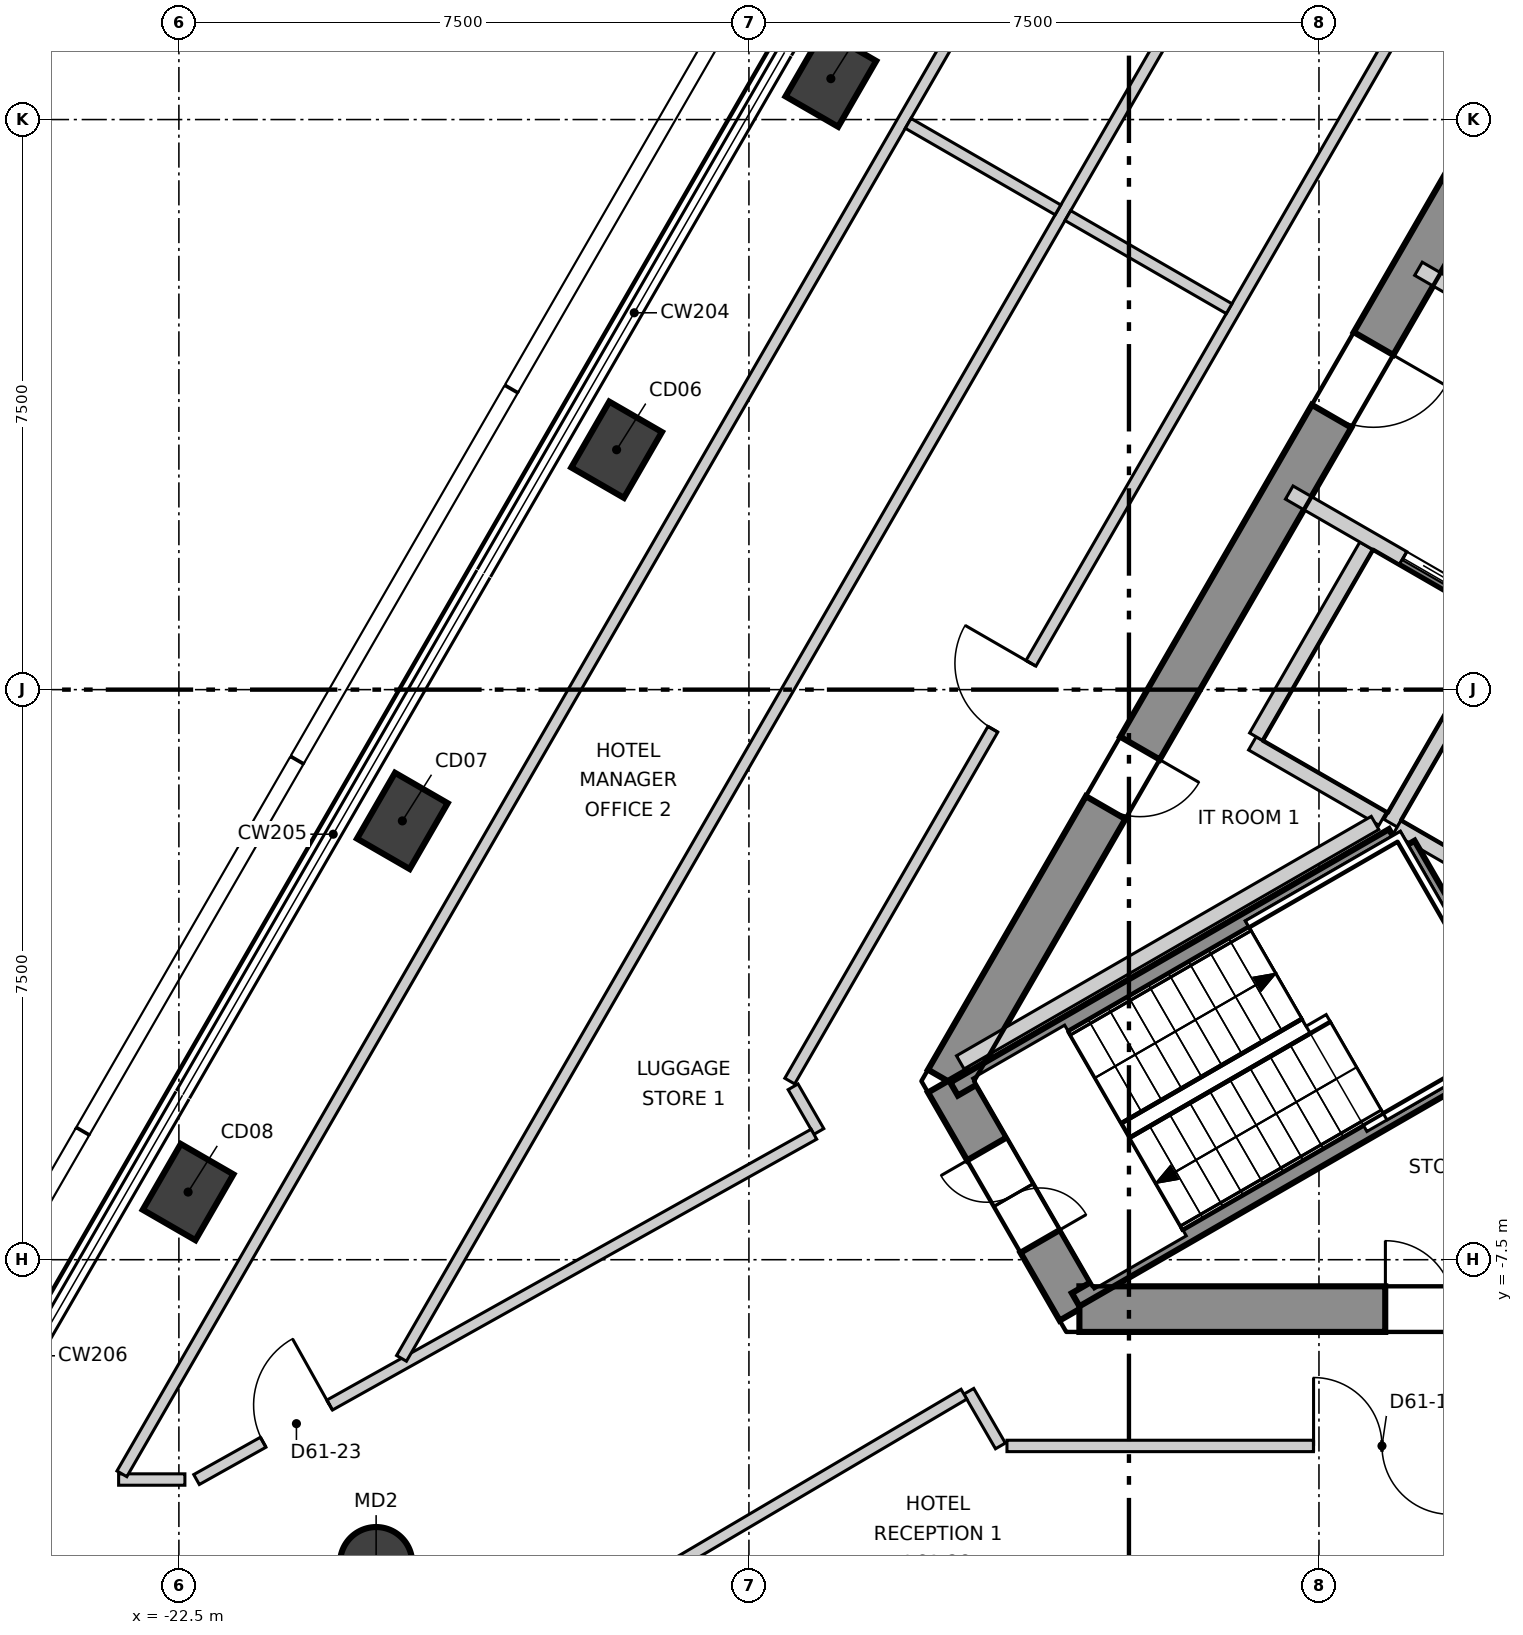
"""IFC4 building model, lengths in metres.
Left out: names, types, materials, properties, quantities, classifications, styles, units other than length and angle.
Written with IfcOpenShell. Run it as: python <this file> out.ifc"""

import sys

from ifc_helpers import new_model, si_unit, direction, frame, frame_2d, origin, origin_2d, place, context, subcontext, project, spatial, polyline, rectangle, circle, outline, extrude, element, fill, save


model = new_model("IFC4")
c1 = context("Model", 3, precision=1e-05, world=origin(), true_north=direction((0.0, 1.0)))
c2 = subcontext(c1, "Body", "Model", "MODEL_VIEW")
j1 = project(units=[si_unit("LENGTHUNIT", "METRE"), si_unit("PLANEANGLEUNIT", "RADIAN")], contexts=[c1])
p1 = place(None, origin())
s1 = spatial("IfcSite", under=j1, at=p1, CompositionType="ELEMENT")
p2 = place(p1, origin())
s2 = spatial("IfcBuilding", under=s1, at=p2, CompositionType="ELEMENT")
p3 = place(p2, frame((0.0, 0.0, 261.8)))
s3 = spatial("IfcBuildingStorey", under=s2, at=p3, CompositionType="ELEMENT", Elevation=261.8)
p4 = place(p3, frame((-1.732, 13.3, -0.3), z_axis=(0.0, 0.0, 1.0), x_axis=(-0.500000539815, -0.866025092122, 0.0)))
e1 = element("IfcWall", 1, at=p4, inside=s3, PredefinedType="SHEAR", context=c2, shape_type="SweptSolid", body=[
    extrude(outline(polyline([(-0.173, -0.3), (1.795, -0.3), (3.763, -0.3), (5.732, -0.3), (7.7, -0.3), (9.668, -0.301), (11.637, -0.301), (13.605, -0.301), (15.573, -0.301), (17.542, -0.301), (19.51, -0.301), (21.478, -0.301), (21.131, 0.3), (19.226, 0.3), (17.321, 0.3), (15.415, 0.3), (13.51, 0.3), (11.605, 0.3), (9.699, 0.3), (7.794, 0.3), (5.889, 0.3), (3.984, 0.3), (2.078, 0.3), (0.173, 0.3), (-0.173, -0.3)])), origin(), (0.0, 0.0, 1.0), 6.5),
])
p5 = place(p4, frame((10.102, 0.0, 0.3)))
e2 = element("IfcOpeningElement", 2, at=p5, cuts=e1, PredefinedType="OPENING", context=c2, shape_type="SweptSolid", body=[
    extrude(rectangle(XDim=1.1, YDim=2.1, at=frame_2d((0.55, 1.05))), frame((0.0, 0.31, 0.0), z_axis=(0.0, -1.0, 0.0), x_axis=(1.0, 0.0, 0.0)), (0.0, 0.0, 1.0), 0.621),
])
p6 = place(p4, frame((16.248, 0.0, 0.3)))
e3 = element("IfcOpeningElement", 3, at=p6, cuts=e1, PredefinedType="OPENING", context=c2, shape_type="SweptSolid", body=[
    extrude(rectangle(XDim=0.9, YDim=2.1, at=frame_2d((0.45, 1.05))), frame((0.0, 0.31, 0.0), z_axis=(0.0, -1.0, 0.0), x_axis=(1.0, 0.0, 0.0)), (0.0, 0.0, 1.0), 0.621),
])
p7 = place(p3, frame((-12.384, -5.15, -0.3), z_axis=(0.0, 0.0, 1.0), x_axis=(0.49997462182, -0.866040055388, 0.0)))
e4 = element("IfcWall", 4, at=p7, inside=s3, PredefinedType="SHEAR", context=c2, shape_type="SweptSolid", body=[
    extrude(outline(polyline([(-0.173, -0.301), (1.732, -0.301), (3.637, -0.3), (3.291, 0.3), (1.732, 0.3), (0.173, 0.3), (-0.173, -0.301)])), origin(), (0.0, 0.0, 1.0), 6.5),
])
p8 = place(p7, frame((1.032, 0.0, 0.3)))
e5 = element("IfcOpeningElement", 5, at=p8, cuts=e4, PredefinedType="OPENING", context=c2, shape_type="SweptSolid", body=[
    extrude(rectangle(XDim=1.4, YDim=2.1, at=frame_2d((0.7, 1.05))), frame((0.0, 0.31, 0.0), z_axis=(0.0, -1.0, 0.0), x_axis=(1.0, 0.0, 0.0)), (0.0, 0.0, 1.0), 0.621),
])
p9 = place(p3, frame((-10.652, -8.15, -0.3), z_axis=(0.0, 0.0, 1.0), x_axis=(1.0, 0.0, 0.0)))
e6 = element("IfcWall", 6, at=p9, inside=s3, PredefinedType="SHEAR", context=c2, shape_type="SweptSolid", body=[
    extrude(outline(polyline([(-0.173, -0.3), (1.795, -0.3), (3.763, -0.3), (5.731, -0.3), (7.7, -0.3), (9.668, -0.3), (11.636, -0.3), (13.604, -0.3), (15.573, -0.3), (17.541, -0.3), (19.509, -0.3), (21.477, -0.3), (21.131, 0.3), (19.226, 0.3), (17.321, 0.3), (15.415, 0.3), (13.51, 0.3), (11.605, 0.3), (9.699, 0.3), (7.794, 0.3), (5.889, 0.3), (3.984, 0.3), (2.078, 0.3), (0.173, 0.3), (-0.173, -0.3)])), origin(), (0.0, 0.0, 1.0), 6.5),
])
p10 = place(p9, frame((4.026, 0.0, 0.3)))
e7 = element("IfcOpeningElement", 7, at=p10, cuts=e6, PredefinedType="OPENING", context=c2, shape_type="SweptSolid", body=[
    extrude(rectangle(XDim=0.9, YDim=2.1, at=frame_2d((0.45, 1.05))), frame((0.0, 0.31, 0.0), z_axis=(0.0, -1.0, 0.0), x_axis=(1.0, 0.0, 0.0)), (0.0, 0.0, 1.0), 0.62),
])
p11 = place(p9, frame((16.378, 0.0, 0.3)))
e8 = element("IfcOpeningElement", 8, at=p11, cuts=e6, PredefinedType="OPENING", context=c2, shape_type="SweptSolid", body=[
    extrude(rectangle(XDim=0.9, YDim=2.1, at=frame_2d((0.45, 1.05))), frame((0.0, 0.31, 0.0), z_axis=(0.0, -1.0, 0.0), x_axis=(1.0, 0.0, 0.0)), (0.0, 0.0, 1.0), 0.62),
])
for number, where, z_axis, x_axis in (
    (9, (-13.922, 8.038, -0.3), (0.0, 0.0, 1.0), (0.5, 0.866, 0.0)),
    (10, (-16.741, 3.156, -0.3), (0.0, 0.0, 1.0), (0.5, 0.866, 0.0)),
    (11, (-19.56, -1.727, -0.3), (0.0, 0.0, 1.0), (0.5, 0.866, 0.0)),
    (12, (-22.379, -6.61, -0.3), (0.0, 0.0, 1.0), (0.5, 0.866, 0.0)),
):
    element("IfcColumn", number, at=place(p3, frame(where, z_axis=z_axis, x_axis=x_axis)), inside=s3, PredefinedType="COLUMN", context=c2, shape_type="SweptSolid", body=[
        extrude(rectangle(XDim=1.0, YDim=0.8, at=origin_2d()), origin(), (0.0, 0.0, 1.0), 6.5),
    ])
p12 = place(p3, frame((-19.905, -11.492, -0.3), z_axis=(0.0, 0.0, 1.0), x_axis=(1.0, 0.0, 0.0)))
e13 = element("IfcColumn", 13, at=p12, inside=s3, PredefinedType="COLUMN", context=c2, shape_type="SweptSolid", body=[
    extrude(circle(Radius=0.475, at=origin_2d()), origin(), (0.0, 0.0, 1.0), 6.5),
])
p13 = place(p3, frame((-14.463, -5.15, 0.0), z_axis=(0.0, 0.0, 1.0), x_axis=(0.500017691629, 0.866015189277, 0.0)))
e14 = element("IfcWall", 14, at=p13, inside=s3, PredefinedType="PARTITIONING", context=c2, shape_type="SweptSolid", body=[
    extrude(rectangle(XDim=23.383, YDim=0.15, at=frame_2d((11.691, 0.0))), origin(), (0.0, 0.0, 1.0), 6.2),
])
p14 = place(p13, frame((17.037, 0.0, 0.0)))
e15 = element("IfcOpeningElement", 15, at=p14, cuts=e14, PredefinedType="OPENING", context=c2, shape_type="SweptSolid", body=[
    extrude(rectangle(XDim=1.0, YDim=2.1, at=frame_2d((0.5, 1.05))), frame((0.0, 0.085, 0.0), z_axis=(0.0, -1.0, 0.0), x_axis=(1.0, 0.0, 0.0)), (0.0, 0.0, 1.0), 0.17),
])
p15 = place(p13, frame((5.346, 0.0, 0.0)))
e16 = element("IfcOpeningElement", 16, at=p15, cuts=e14, PredefinedType="OPENING", context=c2, shape_type="SweptSolid", body=[
    extrude(rectangle(XDim=1.0, YDim=2.1, at=frame_2d((0.5, 1.05))), frame((0.0, 0.085, 0.0), z_axis=(0.0, -1.0, 0.0), x_axis=(1.0, 0.0, 0.0)), (0.0, 0.0, 1.0), 0.17),
])
p16 = place(p3, frame((-14.419, -5.225, 0.0), z_axis=(0.0, 0.0, 1.0), x_axis=(0.499390178911, -0.866377197996, 0.0)))
e17 = element("IfcWall", 17, at=p16, inside=s3, PredefinedType="PARTITIONING", context=c2, shape_type="SweptSolid", body=[
    extrude(rectangle(XDim=0.678, YDim=0.15, at=frame_2d((0.339, 0.0))), origin(), (0.0, 0.0, 1.0), 6.2),
])
p17 = place(p3, frame((-12.107, -9.231, 0.0), z_axis=(0.0, 0.0, 1.0), x_axis=(0.500816129582, -0.865553698133, 0.0)))
e18 = element("IfcWall", 18, at=p17, inside=s3, PredefinedType="PARTITIONING", context=c2, shape_type="SweptSolid", body=[
    extrude(rectangle(XDim=0.831, YDim=0.15, at=frame_2d((0.415, 0.0))), origin(), (0.0, 0.0, 1.0), 6.2),
])
p18 = place(p3, frame((-22.268, -10.392, 0.0), z_axis=(0.0, 0.0, 1.0), x_axis=(0.872777845943, 0.488117641179, 0.0)))
e19 = element("IfcWall", 19, at=p18, inside=s3, PredefinedType="PARTITIONING", context=c2, shape_type="SweptSolid", body=[
    extrude(rectangle(XDim=9.307, YDim=0.15, at=frame_2d((4.654, 0.0))), origin(), (0.0, 0.0, 1.0), 5.65),
])
p19 = place(p18, frame((1.006, 0.0, 0.0)))
e20 = element("IfcOpeningElement", 20, at=p19, cuts=e19, PredefinedType="OPENING", context=c2, shape_type="SweptSolid", body=[
    extrude(rectangle(XDim=1.0, YDim=2.1, at=frame_2d((0.5, 1.05))), frame((0.0, 0.085, 0.0), z_axis=(0.0, -1.0, 0.0), x_axis=(1.0, 0.0, 0.0)), (0.0, 0.0, 1.0), 0.17),
])
p20 = place(p3, frame((-19.571, -8.798, 0.0), z_axis=(0.0, 0.0, 1.0), x_axis=(0.500014166641, 0.866017224516, 0.0)))
e21 = element("IfcWall", 21, at=p20, inside=s3, PredefinedType="PARTITIONING", context=c2, shape_type="SweptSolid", body=[
    extrude(rectangle(XDim=34.991, YDim=0.15, at=frame_2d((17.496, 0.0))), origin(), (0.0, 0.0, 1.0), 6.2),
])
p21 = place(p3, frame((-23.293, -10.392, 0.0), z_axis=(0.0, 0.0, 1.0), x_axis=(1.0, 0.0, 0.0)))
e22 = element("IfcWall", 22, at=p21, inside=s3, PredefinedType="PARTITIONING", context=c2, shape_type="SweptSolid", body=[
    extrude(rectangle(XDim=0.872, YDim=0.15, at=frame_2d((0.436, 0.0))), origin(), (0.0, 0.0, 1.0), 6.2),
])
p22 = place(p3, frame((-23.25, -10.317, 0.0), z_axis=(0.0, 0.0, 1.0), x_axis=(0.500024875003, 0.866011041719, 0.0)))
e23 = element("IfcWall", 23, at=p22, inside=s3, PredefinedType="PARTITIONING", context=c2, shape_type="SweptSolid", body=[
    extrude(rectangle(XDim=41.206, YDim=0.15, at=frame_2d((20.603, 0.0))), origin(), (0.0, 0.0, 1.0), 6.2),
])
p23 = place(p3, frame((-20.026, -13.902, 0.0), z_axis=(0.0, 0.0, 1.0), x_axis=(0.861335565544, 0.508036458859, 0.0)))
e24 = element("IfcWall", 24, at=p23, inside=s3, PredefinedType="PARTITIONING", context=c2, shape_type="SweptSolid", body=[
    extrude(rectangle(XDim=9.12, YDim=0.15, at=frame_2d((4.56, 0.0))), origin(), (0.0, 0.0, 1.0), 5.65),
])
p24 = place(p3, frame((-11.605, -9.95, 0.0), z_axis=(0.0, 0.0, 1.0), x_axis=(1.0, 0.0, 0.0)))
e25 = element("IfcWall", 25, at=p24, inside=s3, PredefinedType="PARTITIONING", context=c2, shape_type="SweptSolid", body=[
    extrude(rectangle(XDim=23.296, YDim=0.15, at=frame_2d((11.648, 0.0))), origin(), (0.0, 0.0, 1.0), 6.2),
])
p25 = place(p24, frame((11.105, 0.0, 0.0)))
e26 = element("IfcOpeningElement", 26, at=p25, cuts=e25, PredefinedType="OPENING", context=c2, shape_type="SweptSolid", body=[
    extrude(rectangle(XDim=1.0, YDim=2.1, at=frame_2d((0.5, 1.05))), frame((0.0, 0.085, 0.0), z_axis=(0.0, -1.0, 0.0), x_axis=(1.0, 0.0, 0.0)), (0.0, 0.0, 1.0), 0.17),
])
p26 = place(p24, frame((4.034, 0.0, 0.0)))
e27 = element("IfcOpeningElement", 27, at=p26, cuts=e25, PredefinedType="OPENING", context=c2, shape_type="SweptSolid", body=[
    extrude(rectangle(XDim=1.8, YDim=2.1, at=frame_2d((0.9, 1.05))), frame((0.0, 0.085, 0.0), z_axis=(0.0, -1.0, 0.0), x_axis=(1.0, 0.0, 0.0)), (0.0, 0.0, 1.0), 0.17),
])
p27 = place(p24, frame((17.776, 0.0, 0.0)))
e28 = element("IfcOpeningElement", 28, at=p27, cuts=e25, PredefinedType="OPENING", context=c2, shape_type="SweptSolid", body=[
    extrude(rectangle(XDim=1.0, YDim=2.1, at=frame_2d((0.5, 1.05))), frame((0.0, 0.085, 0.0), z_axis=(0.0, -1.0, 0.0), x_axis=(1.0, 0.0, 0.0)), (0.0, 0.0, 1.0), 0.17),
])
p28 = place(p3, frame((-12.905, 7.45, 0.0), z_axis=(0.0, 0.0, 1.0), x_axis=(0.866023021914, -0.500004125498, 0.0)))
e29 = element("IfcWall", 29, at=p28, inside=s3, PredefinedType="PARTITIONING", context=c2, shape_type="SweptSolid", body=[
    extrude(rectangle(XDim=2.276, YDim=0.15, at=frame_2d((1.138, 0.0))), origin(), (0.0, 0.0, 1.0), 5.7),
])
p29 = place(p3, frame((-10.804, 6.237, 0.0), z_axis=(0.0, 0.0, 1.0), x_axis=(0.8660395779, -0.499975448907, 0.0)))
e30 = element("IfcWall", 30, at=p29, inside=s3, PredefinedType="PARTITIONING", context=c2, shape_type="SweptSolid", body=[
    extrude(rectangle(XDim=2.45, YDim=0.15, at=frame_2d((1.225, 0.0))), origin(), (0.0, 0.0, 1.0), 5.7),
])
p30 = place(p3, frame((-8.376, -0.707, 0.0), z_axis=(0.0, 0.0, 1.0), x_axis=(0.866072678707, -0.499918108492, 0.0)))
e31 = element("IfcWall", 31, at=p30, inside=s3, PredefinedType="SOLIDWALL", context=c2, shape_type="SweptSolid", body=[
    extrude(rectangle(XDim=1.98, YDim=0.2, at=frame_2d((0.99, 0.0))), origin(), (0.0, 0.0, 1.0), 6.2),
])
p31 = place(p3, frame((-8.326, -0.62, 0.0), z_axis=(0.0, 0.0, 1.0), x_axis=(0.500023687443, 0.866011727401, 0.0)))
e32 = element("IfcWall", 32, at=p31, inside=s3, PredefinedType="SOLIDWALL", context=c2, shape_type="SweptSolid", body=[
    extrude(rectangle(XDim=2.9, YDim=0.2, at=frame_2d((1.45, 0.0))), origin(), (0.0, 0.0, 1.0), 6.2),
])
p32 = place(p3, frame((-7.891, 2.593, 0.0), z_axis=(0.0, 0.0, 1.0), x_axis=(0.866070917804, -0.499921159118, 0.0)))
e33 = element("IfcWall", 33, at=p32, inside=s3, PredefinedType="SOLIDWALL", context=c2, shape_type="SweptSolid", body=[
    extrude(rectangle(XDim=3.333, YDim=0.2, at=frame_2d((1.666, 0.0))), origin(), (0.0, 0.0, 1.0), 6.2),
])
p33 = place(p32, frame((1.73, 0.0, 0.0)))
e34 = element("IfcOpeningElement", 34, at=p33, cuts=e33, PredefinedType="OPENING", context=c2, shape_type="SweptSolid", body=[
    extrude(rectangle(XDim=1.1, YDim=2.1, at=frame_2d((0.55, 1.05))), frame((0.0, 0.11, 0.0), z_axis=(0.0, -1.0, 0.0), x_axis=(1.0, 0.0, 0.0)), (0.0, 0.0, 1.0), 0.22),
])
p34 = place(p3, frame((-6.191, 5.537, 0.0), z_axis=(0.0, 0.0, 1.0), x_axis=(0.866052607023, -0.499952879648, 0.0)))
e35 = element("IfcWall", 35, at=p34, inside=s3, PredefinedType="SOLIDWALL", context=c2, shape_type="SweptSolid", body=[
    extrude(rectangle(XDim=3.332, YDim=0.2, at=frame_2d((1.666, 0.0))), origin(), (0.0, 0.0, 1.0), 6.2),
])
p35 = place(p34, frame((1.83, 0.0, 0.0)))
e36 = element("IfcOpeningElement", 36, at=p35, cuts=e35, PredefinedType="OPENING", context=c2, shape_type="SweptSolid", body=[
    extrude(rectangle(XDim=0.9, YDim=2.1, at=frame_2d((0.45, 1.05))), frame((0.0, 0.11, 0.0), z_axis=(0.0, -1.0, 0.0), x_axis=(1.0, 0.0, 0.0)), (0.0, 0.0, 1.0), 0.22),
])
p36 = place(p3, frame((-6.557, -1.757, 0.0), z_axis=(0.0, 0.0, 1.0), x_axis=(0.499990139034, 0.866031096941, 0.0)))
e37 = element("IfcWall", 37, at=p36, inside=s3, PredefinedType="SOLIDWALL", context=c2, shape_type="SweptSolid", body=[
    extrude(rectangle(XDim=3.0, YDim=0.2, at=frame_2d((1.5, 0.0))), origin(), (0.0, 0.0, 1.0), 6.2),
])
p37 = place(p3, frame((-6.47, -1.807, 0.0), z_axis=(0.0, 0.0, 1.0), x_axis=(0.865883195159, -0.500246231712, 0.0)))
e38 = element("IfcWall", 38, at=p37, inside=s3, PredefinedType="SOLIDWALL", context=c2, shape_type="SweptSolid", body=[
    extrude(rectangle(XDim=1.815, YDim=0.2, at=frame_2d((0.908, 0.0))), origin(), (0.0, 0.0, 1.0), 6.2),
])
p38 = place(p3, frame((-12.219, -4.904, 0.0), z_axis=(0.0, 0.0, 1.0), x_axis=(0.8660578368, 0.499943820161, 0.0)))
e39 = element("IfcWall", 39, at=p38, inside=s3, PredefinedType="SOLIDWALL", context=c2, shape_type="SweptSolid", body=[
    extrude(rectangle(XDim=6.301, YDim=0.2, at=frame_2d((3.15, 0.0))), origin(), (0.0, 0.0, 1.0), 6.2),
])
p39 = place(p3, frame((-12.301, -5.254, 0.0), z_axis=(0.0, 0.0, 1.0), x_axis=(0.866068467981, 0.499925403204, 0.0)))
e40 = element("IfcWall", 40, at=p39, inside=s3, PredefinedType="SOLIDWALL", context=c2, shape_type="SweptSolid", body=[
    extrude(rectangle(XDim=6.665, YDim=0.2, at=frame_2d((3.332, 0.0))), origin(), (0.0, 0.0, 1.0), 6.2),
])
p40 = place(p3, frame((-6.329, -2.038, 0.0), z_axis=(0.0, 0.0, 1.0), x_axis=(0.500200581029, -0.865909567298, 0.0)))
e41 = element("IfcWall", 41, at=p40, inside=s3, PredefinedType="SOLIDWALL", context=c2, shape_type="SweptSolid", body=[
    extrude(rectangle(XDim=2.799, YDim=0.2, at=frame_2d((1.399, 0.0))), origin(), (0.0, 0.0, 1.0), 6.2),
])
p41 = place(p3, frame((-10.701, -8.026, 0.0), z_axis=(0.0, 0.0, 1.0), x_axis=(0.866005022404, 0.500035299925, 0.0)))
e42 = element("IfcWall", 42, at=p41, inside=s3, PredefinedType="SOLIDWALL", context=c2, shape_type="SweptSolid", body=[
    extrude(rectangle(XDim=6.665, YDim=0.2, at=frame_2d((3.333, 0.0))), origin(), (0.0, 0.0, 1.0), 6.2),
])
p42 = place(p33, origin())
e43 = element("IfcDoor", 43, at=p42, inside=s3, OperationType="SLIDING_TO_LEFT", PredefinedType="DOOR", context=c2, shape_type="SweptSolid", body=[
    extrude(rectangle(XDim=1.1, YDim=2.1, at=frame_2d((0.55, 1.05))), frame((0.0, 0.025, 0.0), z_axis=(0.0, -1.0, 0.0), x_axis=(1.0, 0.0, 0.0)), (0.0, 0.0, 1.0), 0.05),
])
fill(e34, e43)
p43 = place(p26, origin())
e44 = element("IfcDoor", 44, at=p43, inside=s3, OperationType="DOUBLE_DOOR_SINGLE_SWING", PredefinedType="DOOR", context=c2, shape_type="SweptSolid", body=[
    extrude(rectangle(XDim=1.8, YDim=2.1, at=frame_2d((0.9, 1.05))), frame((0.0, 0.025, 0.0), z_axis=(0.0, -1.0, 0.0), x_axis=(1.0, 0.0, 0.0)), (0.0, 0.0, 1.0), 0.05),
])
fill(e27, e44)
p44 = place(p15, origin())
e45 = element("IfcDoor", 45, at=p44, inside=s3, OperationType="SINGLE_SWING_LEFT", PredefinedType="DOOR", context=c2, shape_type="SweptSolid", body=[
    extrude(rectangle(XDim=1.0, YDim=2.1, at=frame_2d((0.5, 1.05))), frame((0.0, 0.025, 0.0), z_axis=(0.0, -1.0, 0.0), x_axis=(1.0, 0.0, 0.0)), (0.0, 0.0, 1.0), 0.05),
])
fill(e16, e45)
p45 = place(p19, origin())
e46 = element("IfcDoor", 46, at=p45, inside=s3, OperationType="SINGLE_SWING_LEFT", PredefinedType="DOOR", context=c2, shape_type="SweptSolid", body=[
    extrude(rectangle(XDim=1.0, YDim=2.1, at=frame_2d((0.5, 1.05))), frame((0.0, 0.025, 0.0), z_axis=(0.0, -1.0, 0.0), x_axis=(1.0, 0.0, 0.0)), (0.0, 0.0, 1.0), 0.05),
])
fill(e20, e46)
p46 = place(p8, origin())
e47 = element("IfcDoor", 47, at=p46, inside=s3, OperationType="DOUBLE_DOOR_SINGLE_SWING", PredefinedType="DOOR", context=c2, shape_type="SweptSolid", body=[
    extrude(rectangle(XDim=1.4, YDim=2.1, at=frame_2d((0.7, 1.05))), frame((0.0, 0.025, 0.0), z_axis=(0.0, -1.0, 0.0), x_axis=(1.0, 0.0, 0.0)), (0.0, 0.0, 1.0), 0.05),
])
fill(e5, e47)
p47 = place(p5, origin())
e48 = element("IfcDoor", 48, at=p47, inside=s3, OperationType="SINGLE_SWING_RIGHT", PredefinedType="DOOR", context=c2, shape_type="SweptSolid", body=[
    extrude(rectangle(XDim=1.1, YDim=2.1, at=frame_2d((0.55, 1.05))), frame((0.0, 0.025, 0.0), z_axis=(0.0, -1.0, 0.0), x_axis=(1.0, 0.0, 0.0)), (0.0, 0.0, 1.0), 0.05),
])
fill(e2, e48)
p48 = place(p6, origin())
e49 = element("IfcDoor", 49, at=p48, inside=s3, OperationType="SINGLE_SWING_RIGHT", PredefinedType="DOOR", context=c2, shape_type="SweptSolid", body=[
    extrude(rectangle(XDim=0.9, YDim=2.1, at=frame_2d((0.45, 1.05))), frame((0.0, 0.025, 0.0), z_axis=(0.0, -1.0, 0.0), x_axis=(1.0, 0.0, 0.0)), (0.0, 0.0, 1.0), 0.05),
])
fill(e3, e49)
p49 = place(p10, origin())
e50 = element("IfcDoor", 50, at=p49, inside=s3, OperationType="SINGLE_SWING_RIGHT", PredefinedType="DOOR", context=c2, shape_type="SweptSolid", body=[
    extrude(rectangle(XDim=0.9, YDim=2.1, at=frame_2d((0.45, 1.05))), frame((0.0, 0.025, 0.0), z_axis=(0.0, -1.0, 0.0), x_axis=(1.0, 0.0, 0.0)), (0.0, 0.0, 1.0), 0.05),
])
fill(e7, e50)
save(model, sys.argv[1])
